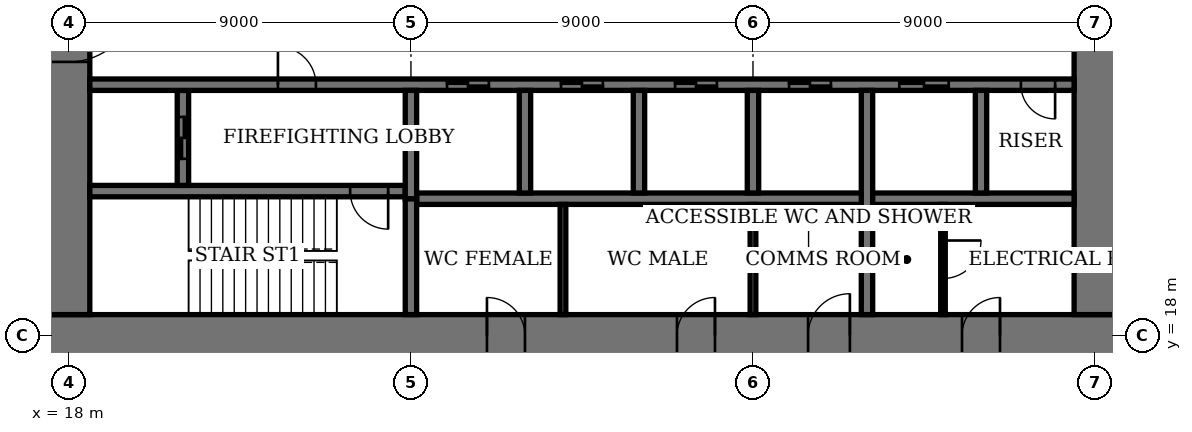
"""IFC4 building model, lengths in metres.
Left out: names, types, materials, properties, quantities, classifications, styles, units other than length and angle.
Written with IfcOpenShell. Run it as: python <this file> out.ifc"""

import sys

from ifc_helpers import new_model, si_unit, direction, frame, frame_2d, origin, place, context, subcontext, project, spatial, rectangle, extrude, element, fill, save


model = new_model("IFC4")
c1 = context("Model", 3, precision=1e-05, world=origin(), true_north=direction((0.0, 1.0)))
c2 = subcontext(c1, "Body", "Model", "MODEL_VIEW")
j1 = project(units=[si_unit("LENGTHUNIT", "METRE"), si_unit("PLANEANGLEUNIT", "RADIAN")], contexts=[c1])
p1 = place(None, origin())
s1 = spatial("IfcSite", under=j1, at=p1, CompositionType="ELEMENT")
p2 = place(p1, origin())
s2 = spatial("IfcBuilding", under=s1, at=p2, CompositionType="ELEMENT")
p3 = place(p2, frame((0.0, 0.0, 47.8)))
s3 = spatial("IfcBuildingStorey", under=s2, at=p3, CompositionType="ELEMENT", Elevation=47.8)
p4 = place(p3, frame((17.45, 18.0, 0.0), z_axis=(0.0, 0.0, 1.0), x_axis=(1.0, 0.0, 0.0)))
e1 = element("IfcWall", 1, at=p4, inside=s3, PredefinedType="SHEAR", context=c2, shape_type="SweptSolid", body=[
    extrude(rectangle(XDim=28.1, YDim=1.1, at=frame_2d((14.05, 0.0))), origin(), (0.0, 0.0, 1.0), 4.0),
])
p5 = place(p4, frame((11.55, 0.0, 0.0)))
e2 = element("IfcOpeningElement", 2, at=p5, cuts=e1, PredefinedType="OPENING", context=c2, shape_type="SweptSolid", body=[
    extrude(rectangle(XDim=1.0, YDim=2.4, at=frame_2d((0.5, 1.2))), frame((0.0, 0.56, 0.0), z_axis=(0.0, -1.0, 0.0), x_axis=(1.0, 0.0, 0.0)), (0.0, 0.0, 1.0), 1.12),
])
p6 = place(p4, frame((16.55, 0.0, 0.0)))
e3 = element("IfcOpeningElement", 3, at=p6, cuts=e1, PredefinedType="OPENING", context=c2, shape_type="SweptSolid", body=[
    extrude(rectangle(XDim=1.0, YDim=2.4, at=frame_2d((0.5, 1.2))), frame((0.0, 0.56, 0.0), z_axis=(0.0, -1.0, 0.0), x_axis=(1.0, 0.0, 0.0)), (0.0, 0.0, 1.0), 1.12),
])
p7 = place(p4, frame((20.0, 0.0, 0.0)))
e4 = element("IfcOpeningElement", 4, at=p7, cuts=e1, PredefinedType="OPENING", context=c2, shape_type="SweptSolid", body=[
    extrude(rectangle(XDim=1.1, YDim=2.4, at=frame_2d((0.55, 1.2))), frame((0.0, 0.56, 0.0), z_axis=(0.0, -1.0, 0.0), x_axis=(1.0, 0.0, 0.0)), (0.0, 0.0, 1.0), 1.12),
])
p8 = place(p4, frame((24.05, 0.0, 0.0)))
e5 = element("IfcOpeningElement", 5, at=p8, cuts=e1, PredefinedType="OPENING", context=c2, shape_type="SweptSolid", body=[
    extrude(rectangle(XDim=1.0, YDim=2.4, at=frame_2d((0.5, 1.2))), frame((0.0, 0.56, 0.0), z_axis=(0.0, -1.0, 0.0), x_axis=(1.0, 0.0, 0.0)), (0.0, 0.0, 1.0), 1.12),
])
p9 = place(p3, frame((18.0, 35.45, 0.0), z_axis=(0.0, 0.0, 1.0), x_axis=(0.0, -1.0, 0.0)))
e6 = element("IfcWall", 6, at=p9, inside=s3, PredefinedType="SHEAR", context=c2, shape_type="SweptSolid", body=[
    extrude(rectangle(XDim=16.9, YDim=1.1, at=frame_2d((8.45, 0.0))), origin(), (0.0, 0.0, 1.0), 4.0),
])
p10 = place(p9, frame((8.45, 0.0, 0.0)))
e7 = element("IfcOpeningElement", 7, at=p10, cuts=e6, PredefinedType="OPENING", context=c2, shape_type="SweptSolid", body=[
    extrude(rectangle(XDim=1.8, YDim=2.4, at=frame_2d((0.9, 1.2))), frame((0.0, 0.56, 0.0), z_axis=(0.0, -1.0, 0.0), x_axis=(1.0, 0.0, 0.0)), (0.0, 0.0, 1.0), 1.12),
])
p11 = place(p3, frame((45.0, 18.55, 0.0), z_axis=(0.0, 0.0, 1.0), x_axis=(0.0, 1.0, 0.0)))
e8 = element("IfcWall", 8, at=p11, inside=s3, PredefinedType="SHEAR", context=c2, shape_type="SweptSolid", body=[
    extrude(rectangle(XDim=16.9, YDim=1.1, at=frame_2d((8.45, 0.0))), origin(), (0.0, 0.0, 1.0), 4.0),
])
p12 = place(p11, frame((8.45, 0.0, 0.0)))
e9 = element("IfcOpeningElement", 9, at=p12, cuts=e8, PredefinedType="OPENING", context=c2, shape_type="SweptSolid", body=[
    extrude(rectangle(XDim=1.8, YDim=2.4, at=frame_2d((0.9, 1.2))), frame((0.0, 0.56, 0.0), z_axis=(0.0, -1.0, 0.0), x_axis=(1.0, 0.0, 0.0)), (0.0, 0.0, 1.0), 1.12),
])
p13 = place(p3, frame((18.55, 21.8, 0.0), z_axis=(0.0, 0.0, 1.0), x_axis=(1.0, 0.0, 0.0)))
e10 = element("IfcWall", 10, at=p13, inside=s3, PredefinedType="SHEAR", context=c2, shape_type="SweptSolid", body=[
    extrude(rectangle(XDim=8.3, YDim=0.3, at=frame_2d((4.15, 0.0))), origin(), (0.0, 0.0, 1.0), 4.0),
])
p14 = place(p13, frame((6.85, 0.0, 0.0)))
e11 = element("IfcOpeningElement", 11, at=p14, cuts=e10, PredefinedType="OPENING", context=c2, shape_type="SweptSolid", body=[
    extrude(rectangle(XDim=1.0, YDim=2.4, at=frame_2d((0.5, 1.2))), frame((0.0, 0.16, 0.0), z_axis=(0.0, -1.0, 0.0), x_axis=(1.0, 0.0, 0.0)), (0.0, 0.0, 1.0), 0.32),
])
p15 = place(p3, frame((27.0, 18.55, 0.0), z_axis=(0.0, 0.0, 1.0), x_axis=(0.0, 1.0, 0.0)))
e12 = element("IfcWall", 12, at=p15, inside=s3, PredefinedType="SHEAR", context=c2, shape_type="SweptSolid", body=[
    extrude(rectangle(XDim=3.05, YDim=0.3, at=frame_2d((1.525, 0.0))), origin(), (0.0, 0.0, 1.0), 4.0),
])
p16 = place(p3, frame((21.0, 21.95, 0.0), z_axis=(0.0, 0.0, 1.0), x_axis=(0.0, 1.0, 0.0)))
e13 = element("IfcWall", 13, at=p16, inside=s3, PredefinedType="SHEAR", context=c2, shape_type="SweptSolid", body=[
    extrude(rectangle(XDim=2.5, YDim=0.3, at=frame_2d((1.25, 0.0))), origin(), (0.0, 0.0, 1.0), 4.0),
])
p17 = place(p16, frame((0.7, 0.0, 0.0)))
e14 = element("IfcOpeningElement", 14, at=p17, cuts=e13, PredefinedType="OPENING", context=c2, shape_type="SweptSolid", body=[
    extrude(rectangle(XDim=1.1, YDim=2.4, at=frame_2d((0.55, 1.2))), frame((0.0, 0.16, 0.0), z_axis=(0.0, -1.0, 0.0), x_axis=(1.0, 0.0, 0.0)), (0.0, 0.0, 1.0), 0.32),
])
p18 = place(p3, frame((18.55, 24.6, 0.0), z_axis=(0.0, 0.0, 1.0), x_axis=(1.0, 0.0, 0.0)))
e15 = element("IfcWall", 15, at=p18, inside=s3, PredefinedType="SHEAR", context=c2, shape_type="SweptSolid", body=[
    extrude(rectangle(XDim=25.9, YDim=0.3, at=frame_2d((12.95, 0.0))), origin(), (0.0, 0.0, 1.0), 4.0),
])
p19 = place(p18, frame((4.95, 0.0, 0.0)))
e16 = element("IfcOpeningElement", 16, at=p19, cuts=e15, PredefinedType="OPENING", context=c2, shape_type="SweptSolid", body=[
    extrude(rectangle(XDim=1.0, YDim=2.4, at=frame_2d((0.5, 1.2))), frame((0.0, 0.16, 0.0), z_axis=(0.0, -1.0, 0.0), x_axis=(1.0, 0.0, 0.0)), (0.0, 0.0, 1.0), 0.32),
])
p20 = place(p18, frame((24.5, 0.0, 0.0)))
e17 = element("IfcOpeningElement", 17, at=p20, cuts=e15, PredefinedType="OPENING", context=c2, shape_type="SweptSolid", body=[
    extrude(rectangle(XDim=0.9, YDim=2.1, at=frame_2d((0.45, 1.05))), frame((0.0, 0.16, 0.0), z_axis=(0.0, -1.0, 0.0), x_axis=(1.0, 0.0, 0.0)), (0.0, 0.0, 1.0), 0.32),
])
p21 = place(p18, frame((9.4, 0.0, 0.0)))
e18 = element("IfcOpeningElement", 18, at=p21, cuts=e15, PredefinedType="OPENING", context=c2, shape_type="SweptSolid", body=[
    extrude(rectangle(XDim=1.1, YDim=2.4, at=frame_2d((0.55, 1.2))), frame((0.0, 0.16, 0.0), z_axis=(0.0, -1.0, 0.0), x_axis=(1.0, 0.0, 0.0)), (0.0, 0.0, 1.0), 0.32),
])
p22 = place(p18, frame((12.4, 0.0, 0.0)))
e19 = element("IfcOpeningElement", 19, at=p22, cuts=e15, PredefinedType="OPENING", context=c2, shape_type="SweptSolid", body=[
    extrude(rectangle(XDim=1.1, YDim=2.4, at=frame_2d((0.55, 1.2))), frame((0.0, 0.16, 0.0), z_axis=(0.0, -1.0, 0.0), x_axis=(1.0, 0.0, 0.0)), (0.0, 0.0, 1.0), 0.32),
])
p23 = place(p18, frame((15.4, 0.0, 0.0)))
e20 = element("IfcOpeningElement", 20, at=p23, cuts=e15, PredefinedType="OPENING", context=c2, shape_type="SweptSolid", body=[
    extrude(rectangle(XDim=1.1, YDim=2.4, at=frame_2d((0.55, 1.2))), frame((0.0, 0.16, 0.0), z_axis=(0.0, -1.0, 0.0), x_axis=(1.0, 0.0, 0.0)), (0.0, 0.0, 1.0), 0.32),
])
p24 = place(p18, frame((18.4, 0.0, 0.0)))
e21 = element("IfcOpeningElement", 21, at=p24, cuts=e15, PredefinedType="OPENING", context=c2, shape_type="SweptSolid", body=[
    extrude(rectangle(XDim=1.1, YDim=2.4, at=frame_2d((0.55, 1.2))), frame((0.0, 0.16, 0.0), z_axis=(0.0, -1.0, 0.0), x_axis=(1.0, 0.0, 0.0)), (0.0, 0.0, 1.0), 0.32),
])
p25 = place(p18, frame((21.3, 0.0, 0.0)))
e22 = element("IfcOpeningElement", 22, at=p25, cuts=e15, PredefinedType="OPENING", context=c2, shape_type="SweptSolid", body=[
    extrude(rectangle(XDim=1.3, YDim=2.4, at=frame_2d((0.65, 1.2))), frame((0.0, 0.16, 0.0), z_axis=(0.0, -1.0, 0.0), x_axis=(1.0, 0.0, 0.0)), (0.0, 0.0, 1.0), 0.32),
])
p26 = place(p3, frame((27.15, 21.6, 0.0), z_axis=(0.0, 0.0, 1.0), x_axis=(1.0, 0.0, 0.0)))
e23 = element("IfcWall", 23, at=p26, inside=s3, PredefinedType="SHEAR", context=c2, shape_type="SweptSolid", body=[
    extrude(rectangle(XDim=17.3, YDim=0.3, at=frame_2d((8.65, 0.0))), origin(), (0.0, 0.0, 1.0), 4.0),
])
for number, where, z_axis, x_axis in (
    (24, (30.0, 21.75, 0.0), (0.0, 0.0, 1.0), (0.0, 1.0, 0.0)),
    (25, (33.0, 21.75, 0.0), (0.0, 0.0, 1.0), (0.0, 1.0, 0.0)),
    (26, (36.0, 21.75, 0.0), (0.0, 0.0, 1.0), (0.0, 1.0, 0.0)),
):
    element("IfcWall", number, at=place(p3, frame(where, z_axis=z_axis, x_axis=x_axis)), inside=s3, PredefinedType="SHEAR", context=c2, shape_type="SweptSolid", body=[
        extrude(rectangle(XDim=2.7, YDim=0.3, at=frame_2d((1.35, 0.0))), origin(), (0.0, 0.0, 1.0), 4.0),
    ])
p27 = place(p3, frame((39.0, 18.55, 0.0), z_axis=(0.0, 0.0, 1.0), x_axis=(0.0, 1.0, 0.0)))
e27 = element("IfcWall", 27, at=p27, inside=s3, PredefinedType="SHEAR", context=c2, shape_type="SweptSolid", body=[
    extrude(rectangle(XDim=5.9, YDim=0.3, at=frame_2d((2.95, 0.0))), origin(), (0.0, 0.0, 1.0), 4.0),
])
p28 = place(p3, frame((42.0, 21.75, 0.0), z_axis=(0.0, 0.0, 1.0), x_axis=(0.0, 1.0, 0.0)))
e28 = element("IfcWall", 28, at=p28, inside=s3, PredefinedType="SHEAR", context=c2, shape_type="SweptSolid", body=[
    extrude(rectangle(XDim=2.7, YDim=0.3, at=frame_2d((1.35, 0.0))), origin(), (0.0, 0.0, 1.0), 4.0),
])
p29 = place(p3, frame((27.0, 21.6, 0.0), z_axis=(0.0, 0.0, 1.0), x_axis=(0.0, 1.0, 0.0)))
e29 = element("IfcWall", 29, at=p29, inside=s3, PredefinedType="SHEAR", context=c2, shape_type="SweptSolid", body=[
    extrude(rectangle(XDim=2.85, YDim=0.3, at=frame_2d((1.425, 0.0))), origin(), (0.0, 0.0, 1.0), 4.0),
])
for number, where, z_axis, x_axis in (
    (30, (31.0, 18.55, 0.0), (0.0, 0.0, 1.0), (0.0, 1.0, 0.0)),
    (31, (36.0, 18.55, 0.0), (0.0, 0.0, 1.0), (0.0, 1.0, 0.0)),
):
    element("IfcWall", number, at=place(p3, frame(where, z_axis=z_axis, x_axis=x_axis)), inside=s3, PredefinedType="PARTITIONING", context=c2, shape_type="SweptSolid", body=[
        extrude(rectangle(XDim=2.9, YDim=0.15, at=frame_2d((1.45, 0.0))), origin(), (0.0, 0.0, 1.0), 3.75),
    ])
p30 = place(p3, frame((41.0, 18.55, 0.0), z_axis=(0.0, 0.0, 1.0), x_axis=(0.0, 1.0, 0.0)))
e32 = element("IfcWall", 32, at=p30, inside=s3, PredefinedType="PARTITIONING", context=c2, shape_type="SweptSolid", body=[
    extrude(rectangle(XDim=2.9, YDim=0.12, at=frame_2d((1.45, 0.0))), origin(), (0.0, 0.0, 1.0), 3.75),
])
p31 = place(p30, frame((0.95, 0.0, 0.0)))
e33 = element("IfcOpeningElement", 33, at=p31, cuts=e32, PredefinedType="OPENING", context=c2, shape_type="SweptSolid", body=[
    extrude(rectangle(XDim=1.0, YDim=2.4, at=frame_2d((0.5, 1.2))), frame((0.0, 0.07, 0.0), z_axis=(0.0, -1.0, 0.0), x_axis=(1.0, 0.0, 0.0)), (0.0, 0.0, 1.0), 0.14),
])
p32 = place(p10, origin())
e34 = element("IfcDoor", 34, at=p32, inside=s3, OperationType="DOUBLE_DOOR_DOUBLE_SWING", PredefinedType="DOOR", context=c2, shape_type="SweptSolid", body=[
    extrude(rectangle(XDim=1.8, YDim=2.4, at=frame_2d((0.9, 1.2))), frame((0.0, 0.03, 0.0), z_axis=(0.0, -1.0, 0.0), x_axis=(1.0, 0.0, 0.0)), (0.0, 0.0, 1.0), 0.06),
    extrude(rectangle(XDim=0.04, YDim=2.4, at=frame_2d((0.02, 1.2))), frame((0.0, 0.55, 0.0), z_axis=(0.0, -1.0, 0.0), x_axis=(1.0, 0.0, 0.0)), (0.0, 0.0, 1.0), 1.1),
    extrude(rectangle(XDim=0.04, YDim=2.4, at=frame_2d((1.78, 1.2))), frame((0.0, 0.55, 0.0), z_axis=(0.0, -1.0, 0.0), x_axis=(1.0, 0.0, 0.0)), (0.0, 0.0, 1.0), 1.1),
    extrude(rectangle(XDim=1.8, YDim=0.04, at=frame_2d((0.9, 2.38))), frame((0.0, 0.55, 0.0), z_axis=(0.0, -1.0, 0.0), x_axis=(1.0, 0.0, 0.0)), (0.0, 0.0, 1.0), 1.1),
])
fill(e7, e34)
p33 = place(p5, origin())
e35 = element("IfcDoor", 35, at=p33, inside=s3, OperationType="SINGLE_SWING_RIGHT", PredefinedType="DOOR", context=c2, shape_type="SweptSolid", body=[
    extrude(rectangle(XDim=1.0, YDim=2.4, at=frame_2d((0.5, 1.2))), frame((0.0, 0.025, 0.0), z_axis=(0.0, -1.0, 0.0), x_axis=(1.0, 0.0, 0.0)), (0.0, 0.0, 1.0), 0.05),
    extrude(rectangle(XDim=0.04, YDim=2.4, at=frame_2d((0.02, 1.2))), frame((0.0, 0.4, 0.0), z_axis=(0.0, -1.0, 0.0), x_axis=(1.0, 0.0, 0.0)), (0.0, 0.0, 1.0), 0.8),
    extrude(rectangle(XDim=0.04, YDim=2.4, at=frame_2d((0.98, 1.2))), frame((0.0, 0.4, 0.0), z_axis=(0.0, -1.0, 0.0), x_axis=(1.0, 0.0, 0.0)), (0.0, 0.0, 1.0), 0.8),
    extrude(rectangle(XDim=1.0, YDim=0.04, at=frame_2d((0.5, 2.38))), frame((0.0, 0.4, 0.0), z_axis=(0.0, -1.0, 0.0), x_axis=(1.0, 0.0, 0.0)), (0.0, 0.0, 1.0), 0.8),
])
fill(e2, e35)
p34 = place(p6, origin())
e36 = element("IfcDoor", 36, at=p34, inside=s3, OperationType="SINGLE_SWING_LEFT", PredefinedType="DOOR", context=c2, shape_type="SweptSolid", body=[
    extrude(rectangle(XDim=1.0, YDim=2.4, at=frame_2d((0.5, 1.2))), frame((0.0, 0.025, 0.0), z_axis=(0.0, -1.0, 0.0), x_axis=(1.0, 0.0, 0.0)), (0.0, 0.0, 1.0), 0.05),
    extrude(rectangle(XDim=0.04, YDim=2.4, at=frame_2d((0.02, 1.2))), frame((0.0, 0.4, 0.0), z_axis=(0.0, -1.0, 0.0), x_axis=(1.0, 0.0, 0.0)), (0.0, 0.0, 1.0), 0.8),
    extrude(rectangle(XDim=0.04, YDim=2.4, at=frame_2d((0.98, 1.2))), frame((0.0, 0.4, 0.0), z_axis=(0.0, -1.0, 0.0), x_axis=(1.0, 0.0, 0.0)), (0.0, 0.0, 1.0), 0.8),
    extrude(rectangle(XDim=1.0, YDim=0.04, at=frame_2d((0.5, 2.38))), frame((0.0, 0.4, 0.0), z_axis=(0.0, -1.0, 0.0), x_axis=(1.0, 0.0, 0.0)), (0.0, 0.0, 1.0), 0.8),
])
fill(e3, e36)
p35 = place(p7, origin())
e37 = element("IfcDoor", 37, at=p35, inside=s3, OperationType="SINGLE_SWING_LEFT", PredefinedType="DOOR", context=c2, shape_type="SweptSolid", body=[
    extrude(rectangle(XDim=1.1, YDim=2.4, at=frame_2d((0.55, 1.2))), frame((0.0, 0.025, 0.0), z_axis=(0.0, -1.0, 0.0), x_axis=(1.0, 0.0, 0.0)), (0.0, 0.0, 1.0), 0.05),
    extrude(rectangle(XDim=0.04, YDim=2.4, at=frame_2d((0.02, 1.2))), frame((0.0, 0.44, 0.0), z_axis=(0.0, -1.0, 0.0), x_axis=(1.0, 0.0, 0.0)), (0.0, 0.0, 1.0), 0.88),
    extrude(rectangle(XDim=0.04, YDim=2.4, at=frame_2d((1.08, 1.2))), frame((0.0, 0.44, 0.0), z_axis=(0.0, -1.0, 0.0), x_axis=(1.0, 0.0, 0.0)), (0.0, 0.0, 1.0), 0.88),
    extrude(rectangle(XDim=1.1, YDim=0.04, at=frame_2d((0.55, 2.38))), frame((0.0, 0.44, 0.0), z_axis=(0.0, -1.0, 0.0), x_axis=(1.0, 0.0, 0.0)), (0.0, 0.0, 1.0), 0.88),
])
fill(e4, e37)
p36 = place(p8, origin())
e38 = element("IfcDoor", 38, at=p36, inside=s3, OperationType="SINGLE_SWING_LEFT", PredefinedType="DOOR", context=c2, shape_type="SweptSolid", body=[
    extrude(rectangle(XDim=1.0, YDim=2.4, at=frame_2d((0.5, 1.2))), frame((0.0, 0.025, 0.0), z_axis=(0.0, -1.0, 0.0), x_axis=(1.0, 0.0, 0.0)), (0.0, 0.0, 1.0), 0.05),
    extrude(rectangle(XDim=0.04, YDim=2.4, at=frame_2d((0.02, 1.2))), frame((0.0, 0.4, 0.0), z_axis=(0.0, -1.0, 0.0), x_axis=(1.0, 0.0, 0.0)), (0.0, 0.0, 1.0), 0.8),
    extrude(rectangle(XDim=0.04, YDim=2.4, at=frame_2d((0.98, 1.2))), frame((0.0, 0.4, 0.0), z_axis=(0.0, -1.0, 0.0), x_axis=(1.0, 0.0, 0.0)), (0.0, 0.0, 1.0), 0.8),
    extrude(rectangle(XDim=1.0, YDim=0.04, at=frame_2d((0.5, 2.38))), frame((0.0, 0.4, 0.0), z_axis=(0.0, -1.0, 0.0), x_axis=(1.0, 0.0, 0.0)), (0.0, 0.0, 1.0), 0.8),
])
fill(e5, e38)
p37 = place(p14, origin())
e39 = element("IfcDoor", 39, at=p37, inside=s3, OperationType="SINGLE_SWING_RIGHT", PredefinedType="DOOR", context=c2, shape_type="SweptSolid", body=[
    extrude(rectangle(XDim=1.0, YDim=2.4, at=frame_2d((0.5, 1.2))), frame((0.0, 0.03, 0.0), z_axis=(0.0, -1.0, 0.0), x_axis=(1.0, 0.0, 0.0)), (0.0, 0.0, 1.0), 0.06),
])
fill(e11, e39)
p38 = place(p19, origin())
e40 = element("IfcDoor", 40, at=p38, inside=s3, OperationType="SINGLE_SWING_RIGHT", PredefinedType="DOOR", context=c2, shape_type="SweptSolid", body=[
    extrude(rectangle(XDim=1.0, YDim=2.4, at=frame_2d((0.5, 1.2))), frame((0.0, 0.03, 0.0), z_axis=(0.0, -1.0, 0.0), x_axis=(1.0, 0.0, 0.0)), (0.0, 0.0, 1.0), 0.06),
])
fill(e16, e40)
p39 = place(p20, origin())
e41 = element("IfcDoor", 41, at=p39, inside=s3, OperationType="SINGLE_SWING_RIGHT", PredefinedType="DOOR", context=c2, shape_type="SweptSolid", body=[
    extrude(rectangle(XDim=0.9, YDim=2.1, at=frame_2d((0.45, 1.05))), frame((0.0, 0.03, 0.0), z_axis=(0.0, -1.0, 0.0), x_axis=(1.0, 0.0, 0.0)), (0.0, 0.0, 1.0), 0.06),
])
fill(e17, e41)
p40 = place(p31, origin())
e42 = element("IfcDoor", 42, at=p40, inside=s3, OperationType="SINGLE_SWING_RIGHT", PredefinedType="DOOR", context=c2, shape_type="SweptSolid", body=[
    extrude(rectangle(XDim=1.0, YDim=2.4, at=frame_2d((0.5, 1.2))), frame((0.0, 0.03, 0.0), z_axis=(0.0, -1.0, 0.0), x_axis=(1.0, 0.0, 0.0)), (0.0, 0.0, 1.0), 0.06),
])
fill(e33, e42)
p41 = place(p21, origin())
e43 = element("IfcDoor", 43, at=p41, inside=s3, OperationType="DOUBLE_DOOR_SLIDING", PredefinedType="DOOR", context=c2, shape_type="SweptSolid", body=[
    extrude(rectangle(XDim=1.1, YDim=2.4, at=frame_2d((0.55, 1.2))), frame((0.0, 0.02, 0.0), z_axis=(0.0, -1.0, 0.0), x_axis=(1.0, 0.0, 0.0)), (0.0, 0.0, 1.0), 0.04),
])
fill(e18, e43)
p42 = place(p22, origin())
e44 = element("IfcDoor", 44, at=p42, inside=s3, OperationType="DOUBLE_DOOR_SLIDING", PredefinedType="DOOR", context=c2, shape_type="SweptSolid", body=[
    extrude(rectangle(XDim=1.1, YDim=2.4, at=frame_2d((0.55, 1.2))), frame((0.0, 0.02, 0.0), z_axis=(0.0, -1.0, 0.0), x_axis=(1.0, 0.0, 0.0)), (0.0, 0.0, 1.0), 0.04),
])
fill(e19, e44)
p43 = place(p23, origin())
e45 = element("IfcDoor", 45, at=p43, inside=s3, OperationType="DOUBLE_DOOR_SLIDING", PredefinedType="DOOR", context=c2, shape_type="SweptSolid", body=[
    extrude(rectangle(XDim=1.1, YDim=2.4, at=frame_2d((0.55, 1.2))), frame((0.0, 0.02, 0.0), z_axis=(0.0, -1.0, 0.0), x_axis=(1.0, 0.0, 0.0)), (0.0, 0.0, 1.0), 0.04),
])
fill(e20, e45)
p44 = place(p24, origin())
e46 = element("IfcDoor", 46, at=p44, inside=s3, OperationType="DOUBLE_DOOR_SLIDING", PredefinedType="DOOR", context=c2, shape_type="SweptSolid", body=[
    extrude(rectangle(XDim=1.1, YDim=2.4, at=frame_2d((0.55, 1.2))), frame((0.0, 0.02, 0.0), z_axis=(0.0, -1.0, 0.0), x_axis=(1.0, 0.0, 0.0)), (0.0, 0.0, 1.0), 0.04),
])
fill(e21, e46)
p45 = place(p25, origin())
e47 = element("IfcDoor", 47, at=p45, inside=s3, OperationType="DOUBLE_DOOR_SLIDING", PredefinedType="DOOR", context=c2, shape_type="SweptSolid", body=[
    extrude(rectangle(XDim=1.3, YDim=2.4, at=frame_2d((0.65, 1.2))), frame((0.0, 0.02, 0.0), z_axis=(0.0, -1.0, 0.0), x_axis=(1.0, 0.0, 0.0)), (0.0, 0.0, 1.0), 0.04),
])
fill(e22, e47)
p46 = place(p17, origin())
e48 = element("IfcDoor", 48, at=p46, inside=s3, OperationType="DOUBLE_DOOR_SLIDING", PredefinedType="DOOR", context=c2, shape_type="SweptSolid", body=[
    extrude(rectangle(XDim=1.1, YDim=2.4, at=frame_2d((0.55, 1.2))), frame((0.0, 0.03, 0.0), z_axis=(0.0, -1.0, 0.0), x_axis=(1.0, 0.0, 0.0)), (0.0, 0.0, 1.0), 0.06),
])
fill(e14, e48)
save(model, sys.argv[1])
